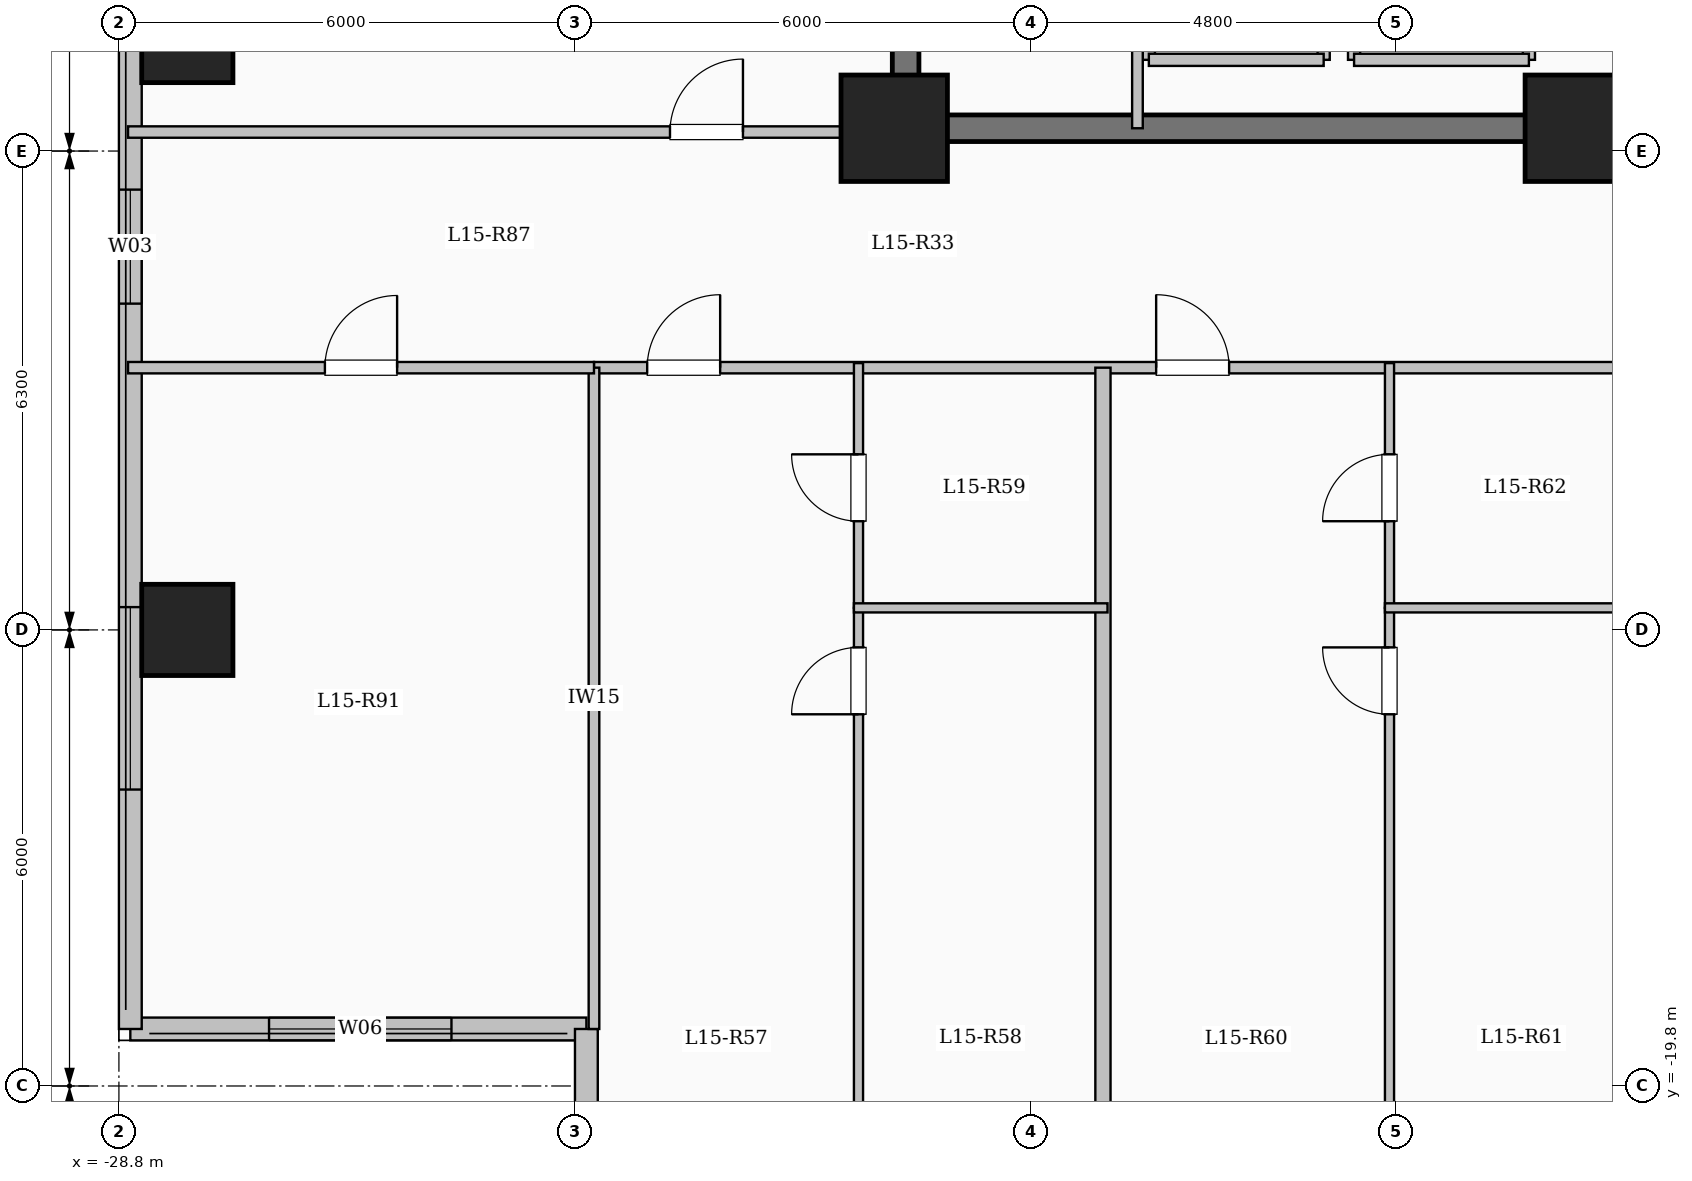
"""IFC4 building model, lengths in metres.
Left out: names, types, materials, properties, quantities, classifications, styles, units other than length and angle.
Written with IfcOpenShell. Run it as: python <this file> out.ifc"""

import sys

from ifc_helpers import new_model, si_unit, direction, frame, frame_2d, origin, origin_2d, place, context, subcontext, project, spatial, rectangle, extrude, element, fill, save


model = new_model("IFC4")
c1 = context("Model", 3, precision=1e-05, world=origin(), true_north=direction((0.0, 1.0)))
c2 = subcontext(c1, "Body", "Model", "MODEL_VIEW")
j1 = project(units=[si_unit("LENGTHUNIT", "METRE"), si_unit("PLANEANGLEUNIT", "RADIAN")], contexts=[c1])
p1 = place(None, origin())
s1 = spatial("IfcSite", under=j1, at=p1, CompositionType="ELEMENT")
p2 = place(p1, origin())
s2 = spatial("IfcBuilding", under=s1, at=p2, CompositionType="ELEMENT")
p3 = place(p2, frame((0.0, 0.0, 57.5)))
s3 = spatial("IfcBuildingStorey", under=s2, at=p3, CompositionType="ELEMENT", Elevation=57.5)
for number, where, z_axis, x_axis in (
    (1, (-9.6, -7.2, 0.0), (0.0, 0.0, 1.0), (1.0, 0.0, 0.0)),
    (2, (-18.6, -7.2, 0.0), (0.0, 0.0, 1.0), (1.0, 0.0, 0.0)),
):
    element("IfcColumn", number, at=place(p3, frame(where, z_axis=z_axis, x_axis=x_axis)), inside=s3, PredefinedType="COLUMN", context=c2, shape_type="SweptSolid", body=[
        extrude(rectangle(XDim=1.4, YDim=1.4, at=origin_2d()), origin(), (0.0, 0.0, 1.0), 3.35),
    ])
for number, where, z_axis, x_axis in (
    (3, (-27.9, -13.8, 0.0), (0.0, 0.0, 1.0), (1.0, 0.0, 0.0)),
    (4, (-27.9, -6.0, 0.0), (0.0, 0.0, 1.0), (1.0, 0.0, 0.0)),
):
    element("IfcColumn", number, at=place(p3, frame(where, z_axis=z_axis, x_axis=x_axis)), inside=s3, PredefinedType="COLUMN", context=c2, shape_type="SweptSolid", body=[
        extrude(rectangle(XDim=1.2, YDim=1.2, at=origin_2d()), origin(), (0.0, 0.0, 1.0), 3.35),
    ])
p4 = place(p3, frame((-22.65, -19.05, 0.0), z_axis=(0.0, 0.0, 1.0), x_axis=(-1.0, 0.0, 0.0)))
e5 = element("IfcWall", 5, at=p4, inside=s3, PredefinedType="SOLIDWALL", context=c2, shape_type="SweptSolid", body=[
    extrude(rectangle(XDim=6.0, YDim=0.3, at=frame_2d((3.0, 0.0))), origin(), (0.0, 0.0, 1.0), 3.1),
])
p5 = place(p4, frame((1.775, 0.0, 0.9)))
e6 = element("IfcOpeningElement", 6, at=p5, cuts=e5, PredefinedType="OPENING", context=c2, shape_type="SweptSolid", body=[
    extrude(rectangle(XDim=2.4, YDim=1.8, at=frame_2d((1.2, 0.9))), frame((0.0, 0.16, 0.0), z_axis=(0.0, -1.0, 0.0), x_axis=(1.0, 0.0, 0.0)), (0.0, 0.0, 1.0), 0.32),
])
p6 = place(p3, frame((-28.65, -19.05, 0.0), z_axis=(0.0, 0.0, 1.0), x_axis=(0.0, 1.0, 0.0)))
e7 = element("IfcWall", 7, at=p6, inside=s3, PredefinedType="SOLIDWALL", context=c2, shape_type="SweptSolid", body=[
    extrude(rectangle(XDim=38.1, YDim=0.3, at=frame_2d((19.05, 0.0))), origin(), (0.0, 0.0, 1.0), 3.1),
])
p7 = place(p6, frame((3.15, 0.0, 0.9)))
e8 = element("IfcOpeningElement", 8, at=p7, cuts=e7, PredefinedType="OPENING", context=c2, shape_type="SweptSolid", body=[
    extrude(rectangle(XDim=2.4, YDim=1.8, at=frame_2d((1.2, 0.9))), frame((0.0, 0.16, 0.0), z_axis=(0.0, -1.0, 0.0), x_axis=(1.0, 0.0, 0.0)), (0.0, 0.0, 1.0), 0.32),
])
p8 = place(p6, frame((9.542, 0.0, 0.9)))
e9 = element("IfcOpeningElement", 9, at=p8, cuts=e7, PredefinedType="OPENING", context=c2, shape_type="SweptSolid", body=[
    extrude(rectangle(XDim=1.5, YDim=1.65, at=frame_2d((0.75, 0.825))), frame((0.0, 0.16, 0.0), z_axis=(0.0, -1.0, 0.0), x_axis=(1.0, 0.0, 0.0)), (0.0, 0.0, 1.0), 0.32),
])
p9 = place(p6, frame((14.95, 0.0, 0.9)))
e10 = element("IfcOpeningElement", 10, at=p9, cuts=e7, PredefinedType="OPENING", context=c2, shape_type="SweptSolid", body=[
    extrude(rectangle(XDim=2.4, YDim=1.8, at=frame_2d((1.2, 0.9))), frame((0.0, 0.16, 0.0), z_axis=(0.0, -1.0, 0.0), x_axis=(1.0, 0.0, 0.0)), (0.0, 0.0, 1.0), 0.32),
])
p10 = place(p6, frame((21.375, 0.0, 0.9)))
e11 = element("IfcOpeningElement", 11, at=p10, cuts=e7, PredefinedType="OPENING", context=c2, shape_type="SweptSolid", body=[
    extrude(rectangle(XDim=1.8, YDim=1.65, at=frame_2d((0.9, 0.825))), frame((0.0, 0.16, 0.0), z_axis=(0.0, -1.0, 0.0), x_axis=(1.0, 0.0, 0.0)), (0.0, 0.0, 1.0), 0.32),
])
p11 = place(p6, frame((25.925, 0.0, 0.9)))
e12 = element("IfcOpeningElement", 12, at=p11, cuts=e7, PredefinedType="OPENING", context=c2, shape_type="SweptSolid", body=[
    extrude(rectangle(XDim=2.0, YDim=1.7, at=frame_2d((1.0, 0.85))), frame((0.0, 0.16, 0.0), z_axis=(0.0, -1.0, 0.0), x_axis=(1.0, 0.0, 0.0)), (0.0, 0.0, 1.0), 0.32),
])
p12 = place(p6, frame((30.175, 0.0, 0.95)))
e13 = element("IfcOpeningElement", 13, at=p12, cuts=e7, PredefinedType="OPENING", context=c2, shape_type="SweptSolid", body=[
    extrude(rectangle(XDim=1.0, YDim=1.5, at=frame_2d((0.5, 0.75))), frame((0.0, 0.16, 0.0), z_axis=(0.0, -1.0, 0.0), x_axis=(1.0, 0.0, 0.0)), (0.0, 0.0, 1.0), 0.32),
])
p13 = place(p6, frame((33.85, 0.0, 0.9)))
e14 = element("IfcOpeningElement", 14, at=p13, cuts=e7, PredefinedType="OPENING", context=c2, shape_type="SweptSolid", body=[
    extrude(rectangle(XDim=2.0, YDim=1.7, at=frame_2d((1.0, 0.85))), frame((0.0, 0.16, 0.0), z_axis=(0.0, -1.0, 0.0), x_axis=(1.0, 0.0, 0.0)), (0.0, 0.0, 1.0), 0.32),
])
p14 = place(p3, frame((-22.65, -23.55, 0.0), z_axis=(0.0, 0.0, 1.0), x_axis=(0.0, 1.0, 0.0)))
e15 = element("IfcWall", 15, at=p14, inside=s3, PredefinedType="SOLIDWALL", context=c2, shape_type="SweptSolid", body=[
    extrude(rectangle(XDim=4.5, YDim=0.3, at=frame_2d((2.25, 0.0))), origin(), (0.0, 0.0, 1.0), 3.1),
])
p15 = place(p14, frame((1.067, 0.0, 0.9)))
e16 = element("IfcOpeningElement", 16, at=p15, cuts=e15, PredefinedType="OPENING", context=c2, shape_type="SweptSolid", body=[
    extrude(rectangle(XDim=2.4, YDim=1.8, at=frame_2d((1.2, 0.9))), frame((0.0, 0.16, 0.0), z_axis=(0.0, -1.0, 0.0), x_axis=(1.0, 0.0, 0.0)), (0.0, 0.0, 1.0), 0.32),
])
p16 = place(p3, frame((-12.55, -6.3, 0.0), z_axis=(0.0, 0.0, 1.0), x_axis=(0.0, 1.0, 0.0)))
e17 = element("IfcWall", 17, at=p16, inside=s3, PredefinedType="SOLIDWALL", context=c2, shape_type="SweptSolid", body=[
    extrude(rectangle(XDim=2.6, YDim=0.16, at=frame_2d((1.3, 0.0))), origin(), (0.0, 0.0, 1.0), 3.1),
])
p17 = place(p3, frame((-10.25, -6.3, 0.0), z_axis=(0.0, 0.0, 1.0), x_axis=(0.0, 1.0, 0.0)))
e18 = element("IfcWall", 18, at=p17, inside=s3, PredefinedType="SOLIDWALL", context=c2, shape_type="SweptSolid", body=[
    extrude(rectangle(XDim=2.6, YDim=0.16, at=frame_2d((1.3, 0.0))), origin(), (0.0, 0.0, 1.0), 3.1),
])
p18 = place(p17, frame((0.75, 0.0, 0.0)))
e19 = element("IfcOpeningElement", 19, at=p18, cuts=e18, PredefinedType="OPENING", context=c2, shape_type="SweptSolid", body=[
    extrude(rectangle(XDim=1.1, YDim=2.15, at=frame_2d((0.55, 1.075))), frame((0.0, 0.09, 0.0), z_axis=(0.0, -1.0, 0.0), x_axis=(1.0, 0.0, 0.0)), (0.0, 0.0, 1.0), 0.18),
])
p19 = place(p3, frame((-12.55, -6.3, 0.0), z_axis=(0.0, 0.0, 1.0), x_axis=(1.0, 0.0, 0.0)))
e20 = element("IfcWall", 20, at=p19, inside=s3, PredefinedType="SOLIDWALL", context=c2, shape_type="SweptSolid", body=[
    extrude(rectangle(XDim=2.3, YDim=0.16, at=frame_2d((1.15, 0.0))), origin(), (0.0, 0.0, 1.0), 3.1),
])
for number, where, z_axis, x_axis in (
    (21, (-15.25, -6.3, 0.0), (0.0, 0.0, 1.0), (0.0, 1.0, 0.0)),
    (22, (-12.95, -6.3, 0.0), (0.0, 0.0, 1.0), (0.0, 1.0, 0.0)),
):
    element("IfcWall", number, at=place(p3, frame(where, z_axis=z_axis, x_axis=x_axis)), inside=s3, PredefinedType="SOLIDWALL", context=c2, shape_type="SweptSolid", body=[
        extrude(rectangle(XDim=2.6, YDim=0.16, at=frame_2d((1.3, 0.0))), origin(), (0.0, 0.0, 1.0), 3.1),
    ])
p20 = place(p3, frame((-15.25, -6.3, 0.0), z_axis=(0.0, 0.0, 1.0), x_axis=(1.0, 0.0, 0.0)))
e23 = element("IfcWall", 23, at=p20, inside=s3, PredefinedType="SOLIDWALL", context=c2, shape_type="SweptSolid", body=[
    extrude(rectangle(XDim=2.3, YDim=0.16, at=frame_2d((1.15, 0.0))), origin(), (0.0, 0.0, 1.0), 3.1),
])
p21 = place(p3, frame((-18.45, -7.375, 0.0), z_axis=(0.0, 0.0, 1.0), x_axis=(0.0, 1.0, 0.0)))
e24 = element("IfcWall", 24, at=p21, inside=s3, PredefinedType="SHEAR", context=c2, shape_type="SweptSolid", body=[
    extrude(rectangle(XDim=14.05, YDim=0.35, at=frame_2d((7.025, 0.0))), origin(), (0.0, 0.0, 1.0), 3.35),
])
p22 = place(p3, frame((-18.625, -7.2, 0.0), z_axis=(0.0, 0.0, 1.0), x_axis=(1.0, 0.0, 0.0)))
e25 = element("IfcWall", 25, at=p22, inside=s3, PredefinedType="SHEAR", context=c2, shape_type="SweptSolid", body=[
    extrude(rectangle(XDim=8.55, YDim=0.35, at=frame_2d((4.275, 0.0))), origin(), (0.0, 0.0, 1.0), 3.35),
])
p23 = place(p3, frame((-15.4, -7.2, 0.0), z_axis=(0.0, 0.0, 1.0), x_axis=(0.0, 1.0, 0.0)))
e26 = element("IfcWall", 26, at=p23, inside=s3, PredefinedType="PARTITIONING", context=c2, shape_type="SweptSolid", body=[
    extrude(rectangle(XDim=10.45, YDim=0.14, at=frame_2d((5.225, 0.0))), origin(), (0.0, 0.0, 1.0), 3.1),
])
p24 = place(p23, frame((9.25, 0.0, 0.0)))
e27 = element("IfcOpeningElement", 27, at=p24, cuts=e26, PredefinedType="OPENING", context=c2, shape_type="SweptSolid", body=[
    extrude(rectangle(XDim=0.9, YDim=2.08, at=frame_2d((0.45, 1.04))), frame((0.0, 0.08, 0.0), z_axis=(0.0, -1.0, 0.0), x_axis=(1.0, 0.0, 0.0)), (0.0, 0.0, 1.0), 0.16),
])
p25 = place(p3, frame((-22.55, -10.35, 0.0), z_axis=(0.0, 0.0, 1.0), x_axis=(1.0, 0.0, 0.0)))
e28 = element("IfcWall", 28, at=p25, inside=s3, PredefinedType="PARTITIONING", context=c2, shape_type="SweptSolid", body=[
    extrude(rectangle(XDim=14.0, YDim=0.15, at=frame_2d((7.0, 0.0))), origin(), (0.0, 0.0, 1.0), 3.1),
])
p26 = place(p25, frame((0.7, 0.0, 0.0)))
e29 = element("IfcOpeningElement", 29, at=p26, cuts=e28, PredefinedType="OPENING", context=c2, shape_type="SweptSolid", body=[
    extrude(rectangle(XDim=0.96, YDim=2.15, at=frame_2d((0.48, 1.075))), frame((0.0, 0.085, 0.0), z_axis=(0.0, -1.0, 0.0), x_axis=(1.0, 0.0, 0.0)), (0.0, 0.0, 1.0), 0.17),
])
p27 = place(p25, frame((7.396, 0.0, 0.0)))
e30 = element("IfcOpeningElement", 30, at=p27, cuts=e28, PredefinedType="OPENING", context=c2, shape_type="SweptSolid", body=[
    extrude(rectangle(XDim=0.96, YDim=2.15, at=frame_2d((0.48, 1.075))), frame((0.0, 0.085, 0.0), z_axis=(0.0, -1.0, 0.0), x_axis=(1.0, 0.0, 0.0)), (0.0, 0.0, 1.0), 0.17),
])
p28 = place(p3, frame((-15.854, -23.6, 0.0), z_axis=(0.0, 0.0, 1.0), x_axis=(0.0, 1.0, 0.0)))
e31 = element("IfcWall", 31, at=p28, inside=s3, PredefinedType="SOLIDWALL", context=c2, shape_type="SweptSolid", body=[
    extrude(rectangle(XDim=13.25, YDim=0.2, at=frame_2d((6.625, 0.0))), origin(), (0.0, 0.0, 1.0), 3.1),
])
p29 = place(p3, frame((-19.07, -23.6, 0.0), z_axis=(0.0, 0.0, 1.0), x_axis=(0.0, 1.0, 0.0)))
e32 = element("IfcWall", 32, at=p29, inside=s3, PredefinedType="PARTITIONING", context=c2, shape_type="SweptSolid", body=[
    extrude(rectangle(XDim=10.09, YDim=0.12, at=frame_2d((5.045, 0.0))), origin(), (0.0, 0.0, 1.0), 3.1),
])
p30 = place(p29, frame((8.69, 0.0, 0.0)))
e33 = element("IfcOpeningElement", 33, at=p30, cuts=e32, PredefinedType="OPENING", context=c2, shape_type="SweptSolid", body=[
    extrude(rectangle(XDim=0.88, YDim=2.1, at=frame_2d((0.44, 1.05))), frame((0.0, 0.07, 0.0), z_axis=(0.0, -1.0, 0.0), x_axis=(1.0, 0.0, 0.0)), (0.0, 0.0, 1.0), 0.14),
])
p31 = place(p3, frame((-19.07, -13.51, 0.0), z_axis=(0.0, 0.0, 1.0), x_axis=(0.0, 1.0, 0.0)))
e34 = element("IfcWall", 34, at=p31, inside=s3, PredefinedType="PARTITIONING", context=c2, shape_type="SweptSolid", body=[
    extrude(rectangle(XDim=3.22, YDim=0.12, at=frame_2d((1.61, 0.0))), origin(), (0.0, 0.0, 1.0), 3.1),
])
p32 = place(p31, frame((1.14, 0.0, 0.0)))
e35 = element("IfcOpeningElement", 35, at=p32, cuts=e34, PredefinedType="OPENING", context=c2, shape_type="SweptSolid", body=[
    extrude(rectangle(XDim=0.88, YDim=2.1, at=frame_2d((0.44, 1.05))), frame((0.0, 0.07, 0.0), z_axis=(0.0, -1.0, 0.0), x_axis=(1.0, 0.0, 0.0)), (0.0, 0.0, 1.0), 0.14),
])
p33 = place(p3, frame((-19.13, -13.51, 0.0), z_axis=(0.0, 0.0, 1.0), x_axis=(1.0, 0.0, 0.0)))
e36 = element("IfcWall", 36, at=p33, inside=s3, PredefinedType="PARTITIONING", context=c2, shape_type="SweptSolid", body=[
    extrude(rectangle(XDim=3.336, YDim=0.12, at=frame_2d((1.668, 0.0))), origin(), (0.0, 0.0, 1.0), 3.1),
])
p34 = place(p3, frame((-12.084, -23.6, 0.0), z_axis=(0.0, 0.0, 1.0), x_axis=(0.0, 1.0, 0.0)))
e37 = element("IfcWall", 37, at=p34, inside=s3, PredefinedType="PARTITIONING", context=c2, shape_type="SweptSolid", body=[
    extrude(rectangle(XDim=10.09, YDim=0.12, at=frame_2d((5.045, 0.0))), origin(), (0.0, 0.0, 1.0), 3.1),
])
p35 = place(p34, frame((8.69, 0.0, 0.0)))
e38 = element("IfcOpeningElement", 38, at=p35, cuts=e37, PredefinedType="OPENING", context=c2, shape_type="SweptSolid", body=[
    extrude(rectangle(XDim=0.88, YDim=2.1, at=frame_2d((0.44, 1.05))), frame((0.0, 0.07, 0.0), z_axis=(0.0, -1.0, 0.0), x_axis=(1.0, 0.0, 0.0)), (0.0, 0.0, 1.0), 0.14),
])
p36 = place(p3, frame((-12.084, -13.51, 0.0), z_axis=(0.0, 0.0, 1.0), x_axis=(0.0, 1.0, 0.0)))
e39 = element("IfcWall", 39, at=p36, inside=s3, PredefinedType="PARTITIONING", context=c2, shape_type="SweptSolid", body=[
    extrude(rectangle(XDim=3.22, YDim=0.12, at=frame_2d((1.61, 0.0))), origin(), (0.0, 0.0, 1.0), 3.1),
])
p37 = place(p36, frame((1.14, 0.0, 0.0)))
e40 = element("IfcOpeningElement", 40, at=p37, cuts=e39, PredefinedType="OPENING", context=c2, shape_type="SweptSolid", body=[
    extrude(rectangle(XDim=0.88, YDim=2.1, at=frame_2d((0.44, 1.05))), frame((0.0, 0.07, 0.0), z_axis=(0.0, -1.0, 0.0), x_axis=(1.0, 0.0, 0.0)), (0.0, 0.0, 1.0), 0.14),
])
p38 = place(p3, frame((-12.144, -13.51, 0.0), z_axis=(0.0, 0.0, 1.0), x_axis=(1.0, 0.0, 0.0)))
e41 = element("IfcWall", 41, at=p38, inside=s3, PredefinedType="PARTITIONING", context=c2, shape_type="SweptSolid", body=[
    extrude(rectangle(XDim=3.604, YDim=0.12, at=frame_2d((1.802, 0.0))), origin(), (0.0, 0.0, 1.0), 3.1),
])
p39 = place(p3, frame((-28.68, -7.25, 0.0), z_axis=(0.0, 0.0, 1.0), x_axis=(1.0, 0.0, 0.0)))
e42 = element("IfcWall", 42, at=p39, inside=s3, PredefinedType="PARTITIONING", context=c2, shape_type="SweptSolid", body=[
    extrude(rectangle(XDim=10.23, YDim=0.15, at=frame_2d((5.115, 0.0))), origin(), (0.0, 0.0, 1.0), 3.1),
])
p40 = place(p39, frame((7.13, 0.0, 0.0)))
e43 = element("IfcOpeningElement", 43, at=p40, cuts=e42, PredefinedType="OPENING", context=c2, shape_type="SweptSolid", body=[
    extrude(rectangle(XDim=0.96, YDim=2.15, at=frame_2d((0.48, 1.075))), frame((0.0, 0.085, 0.0), z_axis=(0.0, -1.0, 0.0), x_axis=(1.0, 0.0, 0.0)), (0.0, 0.0, 1.0), 0.17),
])
p41 = place(p3, frame((-22.55, -19.05, 0.0), z_axis=(0.0, 0.0, 1.0), x_axis=(0.0, 1.0, 0.0)))
e44 = element("IfcWall", 44, at=p41, inside=s3, PredefinedType="PARTITIONING", context=c2, shape_type="SweptSolid", body=[
    extrude(rectangle(XDim=8.7, YDim=0.14, at=frame_2d((4.35, 0.0))), origin(), (0.0, 0.0, 1.0), 3.1),
])
p42 = place(p3, frame((-28.68, -10.35, 0.0), z_axis=(0.0, 0.0, 1.0), x_axis=(1.0, 0.0, 0.0)))
e45 = element("IfcWall", 45, at=p42, inside=s3, PredefinedType="PARTITIONING", context=c2, shape_type="SweptSolid", body=[
    extrude(rectangle(XDim=6.13, YDim=0.15, at=frame_2d((3.065, 0.0))), origin(), (0.0, 0.0, 1.0), 3.1),
])
p43 = place(p42, frame((2.59, 0.0, 0.0)))
e46 = element("IfcOpeningElement", 46, at=p43, cuts=e45, PredefinedType="OPENING", context=c2, shape_type="SweptSolid", body=[
    extrude(rectangle(XDim=0.95, YDim=2.15, at=frame_2d((0.475, 1.075))), frame((0.0, 0.085, 0.0), z_axis=(0.0, -1.0, 0.0), x_axis=(1.0, 0.0, 0.0)), (0.0, 0.0, 1.0), 0.17),
])
p44 = place(p5, origin())
e47 = element("IfcWindow", 47, at=p44, inside=s3, PartitioningType="SINGLE_PANEL", PredefinedType="WINDOW", context=c2, shape_type="SweptSolid", body=[
    extrude(rectangle(XDim=2.4, YDim=1.8, at=frame_2d((1.2, 0.9))), frame((0.0, 0.03, 0.0), z_axis=(0.0, -1.0, 0.0), x_axis=(1.0, 0.0, 0.0)), (0.0, 0.0, 1.0), 0.06),
])
fill(e6, e47)
p45 = place(p7, origin())
e48 = element("IfcWindow", 48, at=p45, inside=s3, PartitioningType="SINGLE_PANEL", PredefinedType="WINDOW", context=c2, shape_type="SweptSolid", body=[
    extrude(rectangle(XDim=2.4, YDim=1.8, at=frame_2d((1.2, 0.9))), frame((0.0, 0.03, 0.0), z_axis=(0.0, -1.0, 0.0), x_axis=(1.0, 0.0, 0.0)), (0.0, 0.0, 1.0), 0.06),
])
fill(e8, e48)
p46 = place(p8, origin())
e49 = element("IfcWindow", 49, at=p46, inside=s3, PartitioningType="SINGLE_PANEL", PredefinedType="WINDOW", context=c2, shape_type="SweptSolid", body=[
    extrude(rectangle(XDim=1.5, YDim=1.65, at=frame_2d((0.75, 0.825))), frame((0.0, 0.03, 0.0), z_axis=(0.0, -1.0, 0.0), x_axis=(1.0, 0.0, 0.0)), (0.0, 0.0, 1.0), 0.06),
])
fill(e9, e49)
p47 = place(p26, origin())
e50 = element("IfcDoor", 50, at=p47, inside=s3, OperationType="SINGLE_SWING_RIGHT", PredefinedType="DOOR", context=c2, shape_type="SweptSolid", body=[
    extrude(rectangle(XDim=0.96, YDim=2.15, at=frame_2d((0.48, 1.075))), frame((0.0, 0.025, 0.0), z_axis=(0.0, -1.0, 0.0), x_axis=(1.0, 0.0, 0.0)), (0.0, 0.0, 1.0), 0.05),
])
fill(e29, e50)
p48 = place(p30, origin())
e51 = element("IfcDoor", 51, at=p48, inside=s3, OperationType="SINGLE_SWING_LEFT", PredefinedType="DOOR", context=c2, shape_type="SweptSolid", body=[
    extrude(rectangle(XDim=0.88, YDim=2.1, at=frame_2d((0.44, 1.05))), frame((0.0, 0.025, 0.0), z_axis=(0.0, -1.0, 0.0), x_axis=(1.0, 0.0, 0.0)), (0.0, 0.0, 1.0), 0.05),
])
fill(e33, e51)
p49 = place(p32, origin())
e52 = element("IfcDoor", 52, at=p49, inside=s3, OperationType="SINGLE_SWING_RIGHT", PredefinedType="DOOR", context=c2, shape_type="SweptSolid", body=[
    extrude(rectangle(XDim=0.88, YDim=2.1, at=frame_2d((0.44, 1.05))), frame((0.0, 0.025, 0.0), z_axis=(0.0, -1.0, 0.0), x_axis=(1.0, 0.0, 0.0)), (0.0, 0.0, 1.0), 0.05),
])
fill(e35, e52)
p50 = place(p27, origin())
e53 = element("IfcDoor", 53, at=p50, inside=s3, OperationType="SINGLE_SWING_LEFT", PredefinedType="DOOR", context=c2, shape_type="SweptSolid", body=[
    extrude(rectangle(XDim=0.96, YDim=2.15, at=frame_2d((0.48, 1.075))), frame((0.0, 0.025, 0.0), z_axis=(0.0, -1.0, 0.0), x_axis=(1.0, 0.0, 0.0)), (0.0, 0.0, 1.0), 0.05),
])
fill(e30, e53)
p51 = place(p35, origin())
e54 = element("IfcDoor", 54, at=p51, inside=s3, OperationType="SINGLE_SWING_RIGHT", PredefinedType="DOOR", context=c2, shape_type="SweptSolid", body=[
    extrude(rectangle(XDim=0.88, YDim=2.1, at=frame_2d((0.44, 1.05))), frame((0.0, 0.025, 0.0), z_axis=(0.0, -1.0, 0.0), x_axis=(1.0, 0.0, 0.0)), (0.0, 0.0, 1.0), 0.05),
])
fill(e38, e54)
p52 = place(p37, origin())
e55 = element("IfcDoor", 55, at=p52, inside=s3, OperationType="SINGLE_SWING_LEFT", PredefinedType="DOOR", context=c2, shape_type="SweptSolid", body=[
    extrude(rectangle(XDim=0.88, YDim=2.1, at=frame_2d((0.44, 1.05))), frame((0.0, 0.025, 0.0), z_axis=(0.0, -1.0, 0.0), x_axis=(1.0, 0.0, 0.0)), (0.0, 0.0, 1.0), 0.05),
])
fill(e40, e55)
p53 = place(p43, origin())
e56 = element("IfcDoor", 56, at=p53, inside=s3, OperationType="SINGLE_SWING_RIGHT", PredefinedType="DOOR", context=c2, shape_type="SweptSolid", body=[
    extrude(rectangle(XDim=0.95, YDim=2.15, at=frame_2d((0.475, 1.075))), frame((0.0, 0.025, 0.0), z_axis=(0.0, -1.0, 0.0), x_axis=(1.0, 0.0, 0.0)), (0.0, 0.0, 1.0), 0.05),
])
fill(e46, e56)
p54 = place(p40, origin())
e57 = element("IfcDoor", 57, at=p54, inside=s3, OperationType="SINGLE_SWING_RIGHT", PredefinedType="DOOR", context=c2, shape_type="SweptSolid", body=[
    extrude(rectangle(XDim=0.96, YDim=2.15, at=frame_2d((0.48, 1.075))), frame((0.0, 0.025, 0.0), z_axis=(0.0, -1.0, 0.0), x_axis=(1.0, 0.0, 0.0)), (0.0, 0.0, 1.0), 0.05),
])
fill(e43, e57)
save(model, sys.argv[1])
